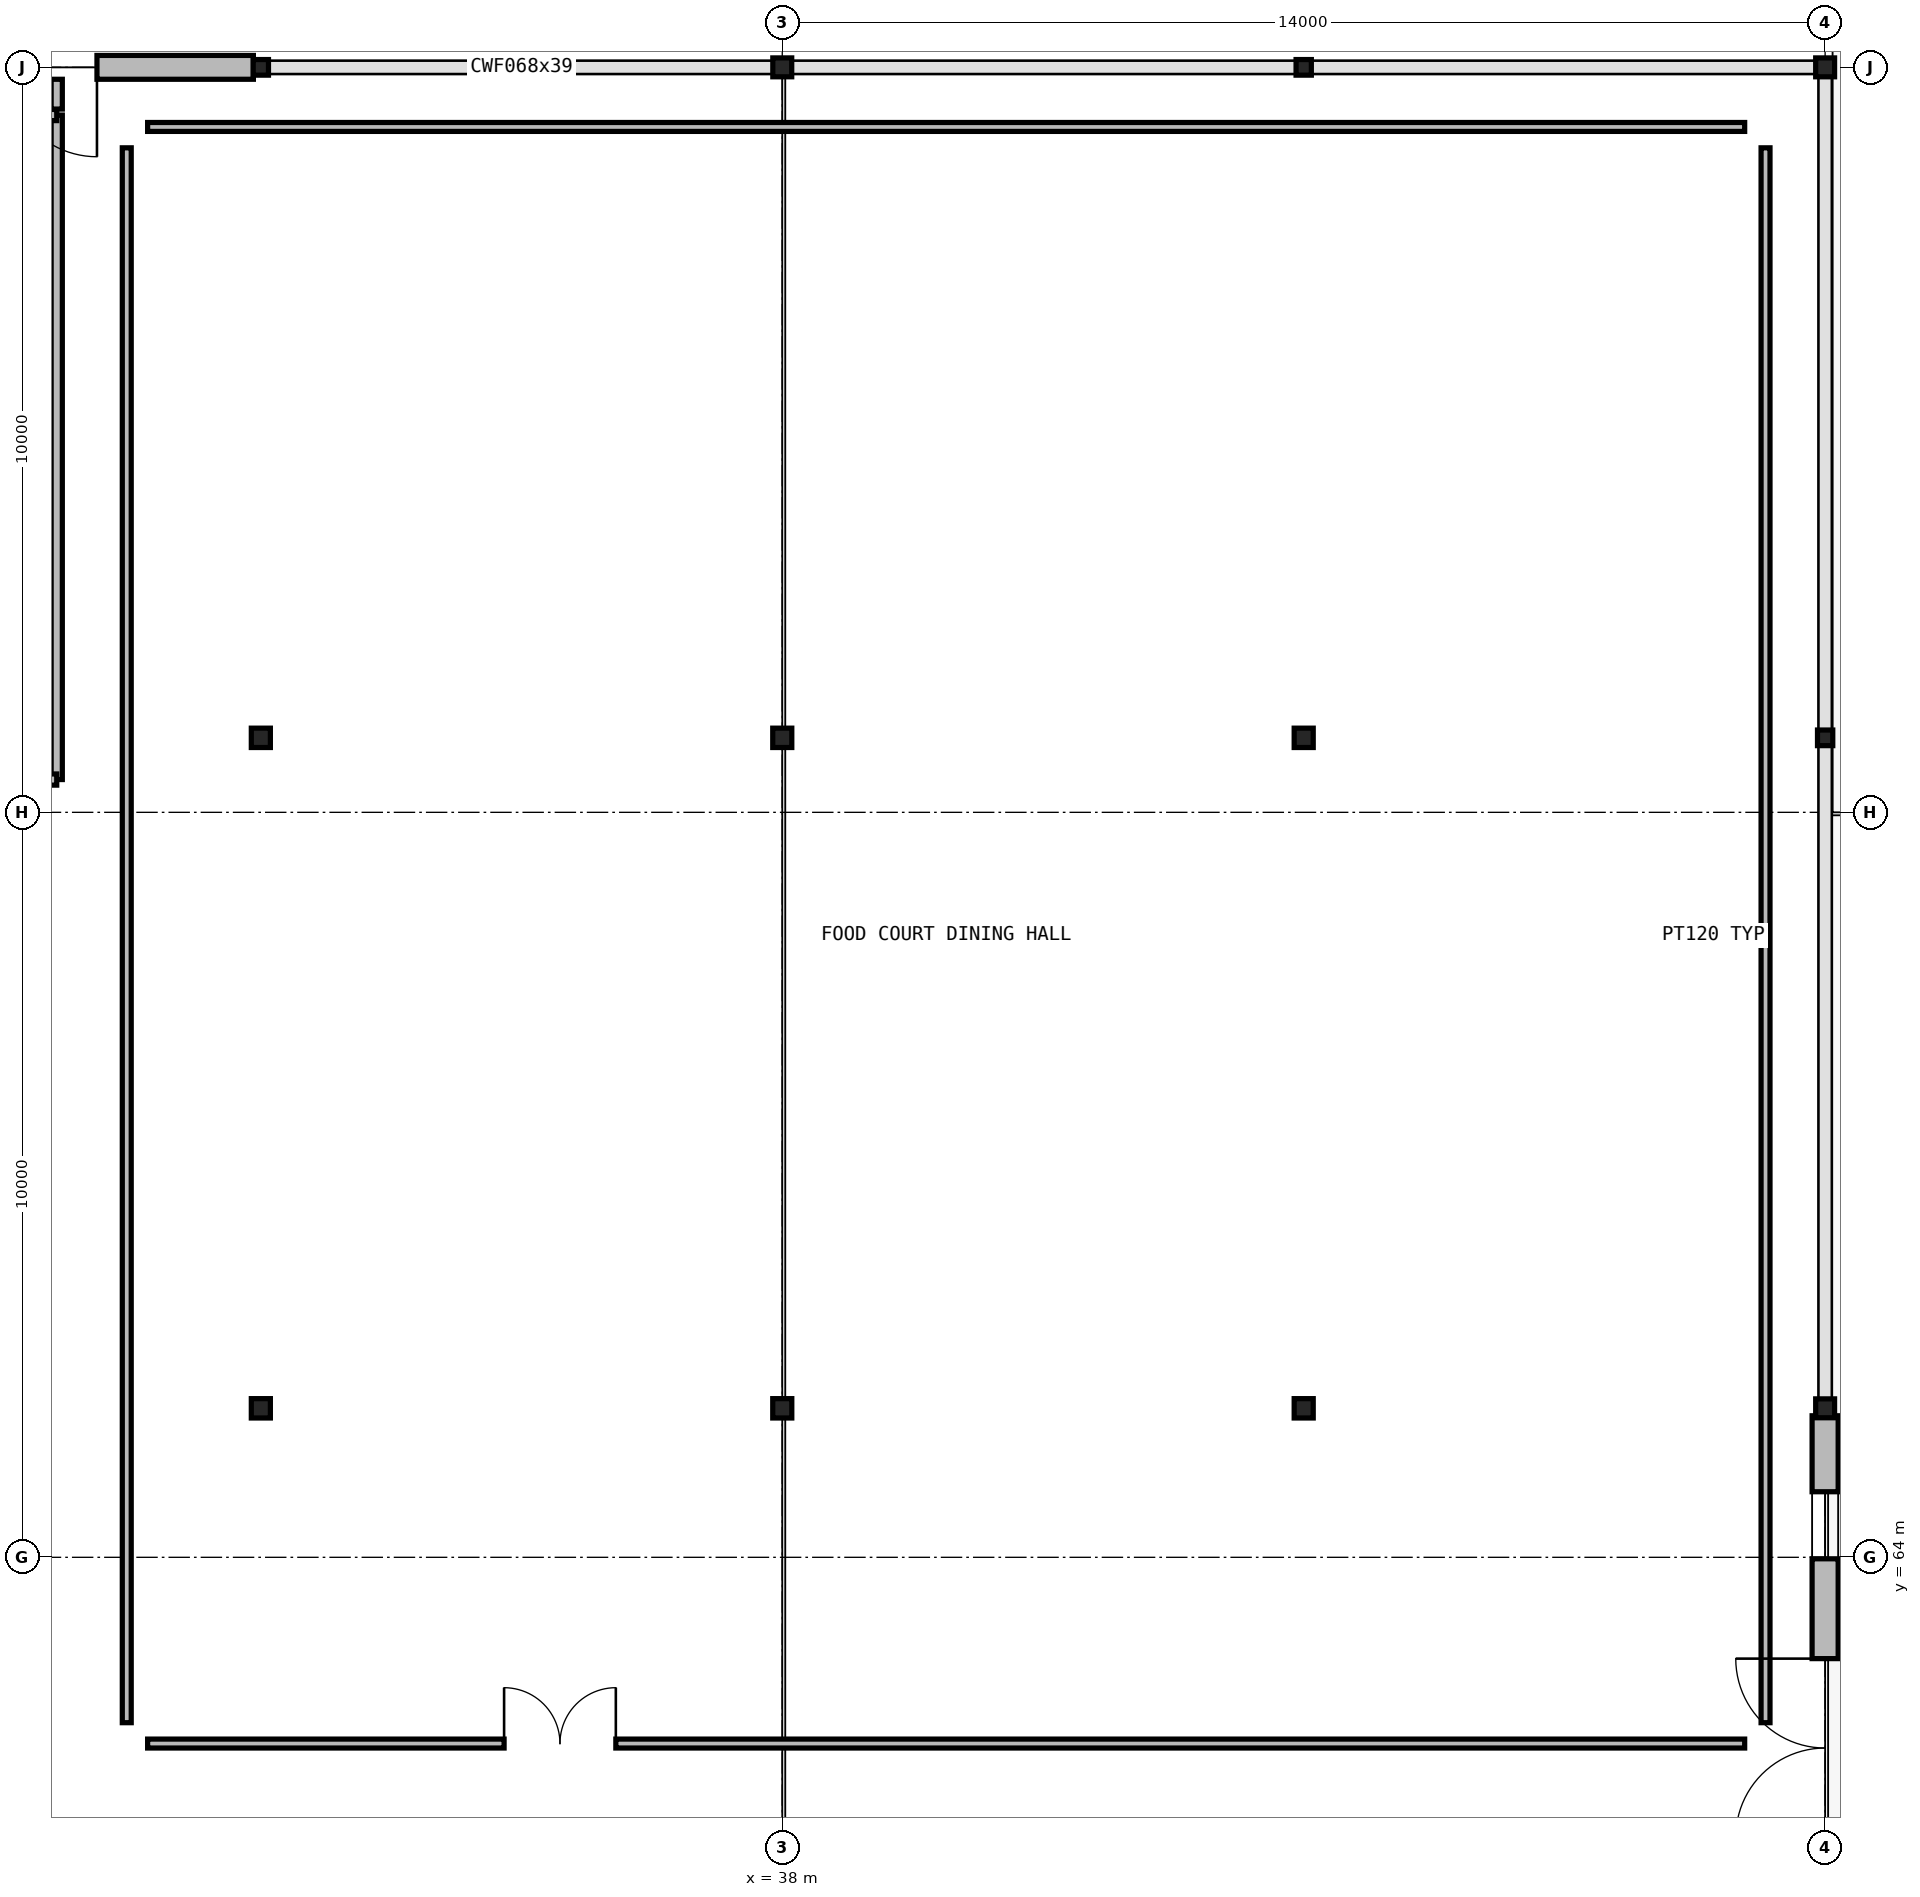
"""IFC4 building model, lengths in metres.
Left out: names, types, materials, properties, quantities, classifications, styles, units other than length and angle.
Written with IfcOpenShell. Run it as: python <this file> out.ifc"""

import sys

from ifc_helpers import new_model, si_unit, direction, frame, frame_2d, origin, origin_2d_with_axis, place, context, subcontext, project, spatial, rectangle, i_section, extrude, element, fill, save


model = new_model("IFC4")
c1 = context("Model", 3, precision=1e-05, world=origin(), true_north=direction((0.0, 1.0)))
c2 = subcontext(c1, "Body", "Model", "MODEL_VIEW")
j1 = project(units=[si_unit("LENGTHUNIT", "METRE"), si_unit("PLANEANGLEUNIT", "RADIAN")], contexts=[c1])
p1 = place(None, origin())
s1 = spatial("IfcSite", under=j1, at=p1, CompositionType="ELEMENT")
p2 = place(p1, origin())
s2 = spatial("IfcBuilding", under=s1, at=p2, CompositionType="ELEMENT")
p3 = place(p2, origin())
s3 = spatial("IfcBuildingStorey", under=s2, at=p3, CompositionType="ELEMENT", Elevation=0.0)
for number, where, z_axis, x_axis in (
    (1, (31.0, 66.0, -0.28), (0.0, 0.0, 1.0), (1.0, 0.0, 0.0)),
    (2, (31.0, 75.0, -0.28), (0.0, 0.0, 1.0), (1.0, 0.0, 0.0)),
):
    element("IfcColumn", number, at=place(p3, frame(where, z_axis=z_axis, x_axis=x_axis)), inside=s3, PredefinedType="COLUMN", context=c2, shape_type="SweptSolid", body=[
        extrude(i_section(OverallWidth=0.256, OverallDepth=0.26, WebThickness=0.01, FlangeThickness=0.017, FilletRadius=0.014, at=origin_2d_with_axis()), origin(), (0.0, 0.0, 1.0), 4.78),
    ])
p4 = place(p3, frame((31.0, 84.0, -0.28), z_axis=(0.0, 0.0, 1.0), x_axis=(1.0, 0.0, 0.0)))
e3 = element("IfcColumn", 3, at=p4, inside=s3, PredefinedType="COLUMN", context=c2, shape_type="SweptSolid", body=[
    extrude(i_section(OverallWidth=0.205, OverallDepth=0.21, WebThickness=0.009, FlangeThickness=0.014, FilletRadius=0.011, at=origin_2d_with_axis()), origin(), (0.0, 0.0, 1.0), 4.78),
])
for number, where, z_axis, x_axis in (
    (4, (38.0, 66.0, -0.28), (0.0, 0.0, 1.0), (1.0, 0.0, 0.0)),
    (5, (38.0, 75.0, -0.28), (0.0, 0.0, 1.0), (1.0, 0.0, 0.0)),
):
    element("IfcColumn", number, at=place(p3, frame(where, z_axis=z_axis, x_axis=x_axis)), inside=s3, PredefinedType="COLUMN", context=c2, shape_type="SweptSolid", body=[
        extrude(i_section(OverallWidth=0.256, OverallDepth=0.26, WebThickness=0.01, FlangeThickness=0.017, FilletRadius=0.014, at=origin_2d_with_axis()), origin(), (0.0, 0.0, 1.0), 4.78),
    ])
p5 = place(p3, frame((38.0, 84.0, -0.28), z_axis=(0.0, 0.0, 1.0), x_axis=(1.0, 0.0, 0.0)))
e6 = element("IfcColumn", 6, at=p5, inside=s3, PredefinedType="COLUMN", context=c2, shape_type="SweptSolid", body=[
    extrude(i_section(OverallWidth=0.254, OverallDepth=0.254, WebThickness=0.009, FlangeThickness=0.014, FilletRadius=0.014, at=origin_2d_with_axis()), origin(), (0.0, 0.0, 1.0), 4.78),
])
for number, where, z_axis, x_axis in (
    (7, (45.0, 66.0, -0.28), (0.0, 0.0, 1.0), (1.0, 0.0, 0.0)),
    (8, (45.0, 75.0, -0.28), (0.0, 0.0, 1.0), (1.0, 0.0, 0.0)),
):
    element("IfcColumn", number, at=place(p3, frame(where, z_axis=z_axis, x_axis=x_axis)), inside=s3, PredefinedType="COLUMN", context=c2, shape_type="SweptSolid", body=[
        extrude(i_section(OverallWidth=0.256, OverallDepth=0.26, WebThickness=0.01, FlangeThickness=0.017, FilletRadius=0.014, at=origin_2d_with_axis()), origin(), (0.0, 0.0, 1.0), 4.78),
    ])
p6 = place(p3, frame((45.0, 84.0, -0.28), z_axis=(0.0, 0.0, 1.0), x_axis=(1.0, 0.0, 0.0)))
e9 = element("IfcColumn", 9, at=p6, inside=s3, PredefinedType="COLUMN", context=c2, shape_type="SweptSolid", body=[
    extrude(i_section(OverallWidth=0.205, OverallDepth=0.21, WebThickness=0.009, FlangeThickness=0.014, FilletRadius=0.011, at=origin_2d_with_axis()), origin(), (0.0, 0.0, 1.0), 4.78),
])
p7 = place(p3, frame((52.0, 66.0, -0.28), z_axis=(0.0, 0.0, 1.0), x_axis=(1.0, 0.0, 0.0)))
e10 = element("IfcColumn", 10, at=p7, inside=s3, PredefinedType="COLUMN", context=c2, shape_type="SweptSolid", body=[
    extrude(i_section(OverallWidth=0.254, OverallDepth=0.254, WebThickness=0.009, FlangeThickness=0.014, FilletRadius=0.014, at=origin_2d_with_axis()), origin(), (0.0, 0.0, 1.0), 4.78),
])
p8 = place(p3, frame((52.0, 75.0, -0.28), z_axis=(0.0, 0.0, 1.0), x_axis=(1.0, 0.0, 0.0)))
e11 = element("IfcColumn", 11, at=p8, inside=s3, PredefinedType="COLUMN", context=c2, shape_type="SweptSolid", body=[
    extrude(i_section(OverallWidth=0.205, OverallDepth=0.21, WebThickness=0.009, FlangeThickness=0.014, FilletRadius=0.011, at=origin_2d_with_axis()), origin(), (0.0, 0.0, 1.0), 4.78),
])
p9 = place(p3, frame((52.0, 84.0, -0.28), z_axis=(0.0, 0.0, 1.0), x_axis=(1.0, 0.0, 0.0)))
e12 = element("IfcColumn", 12, at=p9, inside=s3, PredefinedType="COLUMN", context=c2, shape_type="SweptSolid", body=[
    extrude(i_section(OverallWidth=0.254, OverallDepth=0.254, WebThickness=0.009, FlangeThickness=0.014, FilletRadius=0.014, at=origin_2d_with_axis()), origin(), (0.0, 0.0, 1.0), 4.78),
])
p10 = place(p3, frame((30.9, 84.0, 0.0), z_axis=(0.0, 0.0, 1.0), x_axis=(-1.0, 0.0, 0.0)))
e13 = element("IfcWall", 13, at=p10, inside=s3, PredefinedType="SOLIDWALL", context=c2, shape_type="SweptSolid", body=[
    extrude(rectangle(XDim=6.8, YDim=0.32, at=frame_2d((3.4, 0.0), x_axis=(1.0, 0.0))), origin(), (0.0, 0.0, 1.0), 3.88),
])
p11 = place(p10, frame((2.1, 0.0, 0.0)))
e14 = element("IfcOpeningElement", 14, at=p11, cuts=e13, PredefinedType="OPENING", context=c2, shape_type="SweptSolid", body=[
    extrude(rectangle(XDim=2.4, YDim=2.8, at=frame_2d((1.2, 1.4), x_axis=(1.0, 0.0))), frame((0.0, 0.17, 0.0), z_axis=(0.0, -1.0, 0.0), x_axis=(1.0, 0.0, 0.0)), (0.0, 0.0, 1.0), 0.34),
])
p12 = place(p3, frame((52.0, 57.1, 0.0), z_axis=(0.0, 0.0, 1.0), x_axis=(0.0, 1.0, 0.0)))
e15 = element("IfcWall", 15, at=p12, inside=s3, PredefinedType="SOLIDWALL", context=c2, shape_type="SweptSolid", body=[
    extrude(rectangle(XDim=8.8, YDim=0.35, at=frame_2d((4.4, 0.0), x_axis=(1.0, 0.0))), origin(), (0.0, 0.0, 1.0), 3.88),
])
p13 = place(p12, frame((3.14, 0.0, 0.0)))
e16 = element("IfcOpeningElement", 16, at=p13, cuts=e15, PredefinedType="OPENING", context=c2, shape_type="SweptSolid", body=[
    extrude(rectangle(XDim=2.4, YDim=2.8, at=frame_2d((1.2, 1.4), x_axis=(1.0, 0.0))), frame((0.0, 0.185, 0.0), z_axis=(0.0, -1.0, 0.0), x_axis=(1.0, 0.0, 0.0)), (0.0, 0.0, 1.0), 0.37),
])
p14 = place(p12, frame((0.9, 0.0, 0.85)))
e17 = element("IfcOpeningElement", 17, at=p14, cuts=e15, PredefinedType="OPENING", context=c2, shape_type="SweptSolid", body=[
    extrude(rectangle(XDim=0.9, YDim=2.15, at=frame_2d((0.45, 1.075), x_axis=(1.0, 0.0))), frame((0.0, 0.185, 0.0), z_axis=(0.0, -1.0, 0.0), x_axis=(1.0, 0.0, 0.0)), (0.0, 0.0, 1.0), 0.37),
])
p15 = place(p12, frame((6.88, 0.0, 0.85)))
e18 = element("IfcOpeningElement", 18, at=p15, cuts=e15, PredefinedType="OPENING", context=c2, shape_type="SweptSolid", body=[
    extrude(rectangle(XDim=0.9, YDim=2.15, at=frame_2d((0.45, 1.075), x_axis=(1.0, 0.0))), frame((0.0, 0.185, 0.0), z_axis=(0.0, -1.0, 0.0), x_axis=(1.0, 0.0, 0.0)), (0.0, 0.0, 1.0), 0.37),
])
p16 = place(p3, frame((28.26, 74.44, 0.0), z_axis=(0.0, 0.0, 1.0), x_axis=(0.0, 1.0, 0.0)))
e19 = element("IfcWall", 19, at=p16, inside=s3, PredefinedType="PARTITIONING", context=c2, shape_type="SweptSolid", body=[
    extrude(rectangle(XDim=8.92, YDim=0.15, at=frame_2d((4.46, 0.0), x_axis=(1.0, 0.0))), origin(), (0.0, 0.0, 1.0), 3.66),
])
p17 = place(p3, frame((24.64, 74.44, 0.0), z_axis=(0.0, 0.0, 1.0), x_axis=(1.0, 0.0, 0.0)))
e20 = element("IfcWall", 20, at=p17, inside=s3, PredefinedType="PARTITIONING", context=c2, shape_type="SweptSolid", body=[
    extrude(rectangle(XDim=3.62, YDim=0.15, at=frame_2d((1.81, 0.0), x_axis=(1.0, 0.0))), origin(), (0.0, 0.0, 1.0), 3.66),
])
p18 = place(p3, frame((28.26, 83.36, 0.0), z_axis=(0.0, 0.0, 1.0), x_axis=(-1.0, 0.0, 0.0)))
e21 = element("IfcWall", 21, at=p18, inside=s3, PredefinedType="PARTITIONING", context=c2, shape_type="SweptSolid", body=[
    extrude(rectangle(XDim=3.62, YDim=0.15, at=frame_2d((1.81, 0.0), x_axis=(1.0, 0.0))), origin(), (0.0, 0.0, 1.0), 3.66),
])
p19 = place(p18, frame((1.31, 0.0, 0.0)))
e22 = element("IfcOpeningElement", 22, at=p19, cuts=e21, PredefinedType="OPENING", context=c2, shape_type="SweptSolid", body=[
    extrude(rectangle(XDim=1.0, YDim=2.15, at=frame_2d((0.5, 1.075), x_axis=(1.0, 0.0))), frame((0.0, 0.085, 0.0), z_axis=(0.0, -1.0, 0.0), x_axis=(1.0, 0.0, 0.0)), (0.0, 0.0, 1.0), 0.17),
])
p20 = place(p3, frame((28.26, 83.44, 0.0), z_axis=(0.0, 0.0, 1.0), x_axis=(0.0, 1.0, 0.0)))
e23 = element("IfcWall", 23, at=p20, inside=s3, PredefinedType="PARTITIONING", context=c2, shape_type="SweptSolid", body=[
    extrude(rectangle(XDim=0.4, YDim=0.15, at=frame_2d((0.2, 0.0), x_axis=(1.0, 0.0))), origin(), (0.0, 0.0, 1.0), 3.86),
])
p21 = place(p3, frame((29.48, 61.5, 0.0), z_axis=(0.0, 0.0, 1.0), x_axis=(1.0, 0.0, 0.0)))
e24 = element("IfcWall", 24, at=p21, inside=s3, PredefinedType="PARTITIONING", context=c2, shape_type="SweptSolid", body=[
    extrude(rectangle(XDim=21.44, YDim=0.12, at=frame_2d((10.72, 0.0), x_axis=(1.0, 0.0))), origin(), (0.0, 0.0, 1.0), 3.62),
])
p22 = place(p21, frame((4.786, 0.0, 0.0)))
e25 = element("IfcOpeningElement", 25, at=p22, cuts=e24, PredefinedType="OPENING", context=c2, shape_type="SweptSolid", body=[
    extrude(rectangle(XDim=1.5, YDim=2.25, at=frame_2d((0.75, 1.125), x_axis=(1.0, 0.0))), frame((0.0, 0.07, 0.0), z_axis=(0.0, -1.0, 0.0), x_axis=(1.0, 0.0, 0.0)), (0.0, 0.0, 1.0), 0.14),
])
p23 = place(p3, frame((51.2, 61.78, 0.0), z_axis=(0.0, 0.0, 1.0), x_axis=(0.0, 1.0, 0.0)))
e26 = element("IfcWall", 26, at=p23, inside=s3, PredefinedType="PARTITIONING", context=c2, shape_type="SweptSolid", body=[
    extrude(rectangle(XDim=21.14, YDim=0.12, at=frame_2d((10.57, 0.0), x_axis=(1.0, 0.0))), origin(), (0.0, 0.0, 1.0), 3.62),
])
p24 = place(p3, frame((50.92, 83.2, 0.0), z_axis=(0.0, 0.0, 1.0), x_axis=(-1.0, 0.0, 0.0)))
e27 = element("IfcWall", 27, at=p24, inside=s3, PredefinedType="PARTITIONING", context=c2, shape_type="SweptSolid", body=[
    extrude(rectangle(XDim=21.44, YDim=0.12, at=frame_2d((10.72, 0.0), x_axis=(1.0, 0.0))), origin(), (0.0, 0.0, 1.0), 3.62),
])
p25 = place(p3, frame((29.2, 82.92, 0.0), z_axis=(0.0, 0.0, 1.0), x_axis=(0.0, -1.0, 0.0)))
e28 = element("IfcWall", 28, at=p25, inside=s3, PredefinedType="PARTITIONING", context=c2, shape_type="SweptSolid", body=[
    extrude(rectangle(XDim=21.14, YDim=0.12, at=frame_2d((10.57, 0.0), x_axis=(1.0, 0.0))), origin(), (0.0, 0.0, 1.0), 3.62),
])
p26 = place(p11, origin())
e29 = element("IfcDoor", 29, at=p26, inside=s3, OperationType="DOUBLE_SWING_RIGHT", PredefinedType="DOOR", context=c2, shape_type="SweptSolid", body=[
    extrude(rectangle(XDim=2.4, YDim=2.8, at=frame_2d((1.2, 1.4), x_axis=(1.0, 0.0))), frame((0.0, 0.025, 0.0), z_axis=(0.0, -1.0, 0.0), x_axis=(1.0, 0.0, 0.0)), (0.0, 0.0, 1.0), 0.05),
])
fill(e14, e29)
p27 = place(p13, origin())
e30 = element("IfcDoor", 30, at=p27, inside=s3, OperationType="DOUBLE_SWING_LEFT", PredefinedType="DOOR", context=c2, shape_type="SweptSolid", body=[
    extrude(rectangle(XDim=2.4, YDim=2.8, at=frame_2d((1.2, 1.4), x_axis=(1.0, 0.0))), frame((0.0, 0.025, 0.0), z_axis=(0.0, -1.0, 0.0), x_axis=(1.0, 0.0, 0.0)), (0.0, 0.0, 1.0), 0.05),
])
fill(e16, e30)
p28 = place(p15, origin())
e31 = element("IfcWindow", 31, at=p28, inside=s3, PartitioningType="SINGLE_PANEL", PredefinedType="WINDOW", context=c2, shape_type="SweptSolid", body=[
    extrude(rectangle(XDim=0.9, YDim=2.15, at=frame_2d((0.45, 1.075), x_axis=(1.0, 0.0))), frame((0.0, 0.03, 0.0), z_axis=(0.0, -1.0, 0.0), x_axis=(1.0, 0.0, 0.0)), (0.0, 0.0, 1.0), 0.06),
])
fill(e18, e31)
p29 = place(p22, origin())
e32 = element("IfcDoor", 32, at=p29, inside=s3, OperationType="DOUBLE_SWING_RIGHT", PredefinedType="DOOR", context=c2, shape_type="SweptSolid", body=[
    extrude(rectangle(XDim=1.5, YDim=2.25, at=frame_2d((0.75, 1.125), x_axis=(1.0, 0.0))), frame((0.0, 0.025, 0.0), z_axis=(0.0, -1.0, 0.0), x_axis=(1.0, 0.0, 0.0)), (0.0, 0.0, 1.0), 0.05),
])
fill(e25, e32)
save(model, sys.argv[1])
